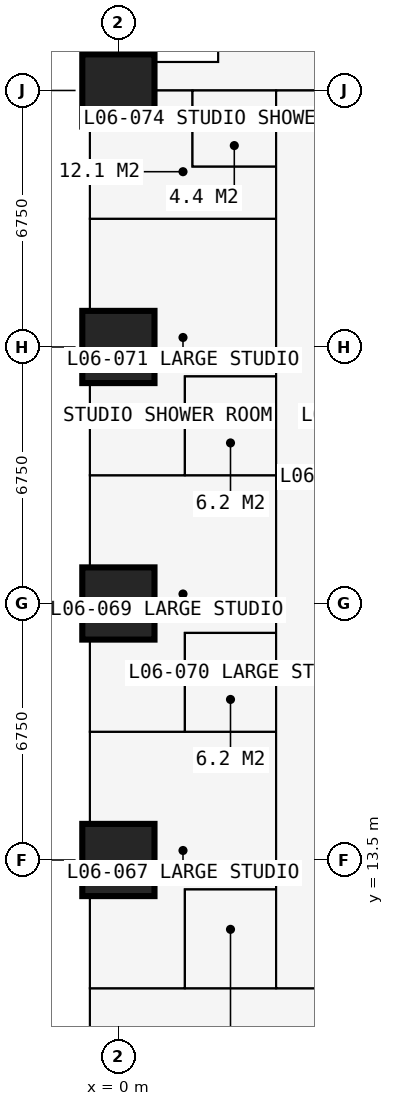
"""IFC4 building model, lengths in metres.
Left out: names, types, materials, properties, quantities, classifications, styles, units other than length and angle.
Written with IfcOpenShell. Run it as: python <this file> out.ifc"""

import sys

from ifc_helpers import new_model, si_unit, direction, frame, frame_2d, origin, origin_2d, place, context, subcontext, project, spatial, rectangle, extrude, element, fill, save


model = new_model("IFC4")
c1 = context("Model", 3, precision=1e-05, world=origin(), true_north=direction((0.0, 1.0)))
c2 = subcontext(c1, "Body", "Model", "MODEL_VIEW")
j1 = project(units=[si_unit("LENGTHUNIT", "METRE"), si_unit("PLANEANGLEUNIT", "RADIAN")], contexts=[c1])
p1 = place(None, origin())
s1 = spatial("IfcSite", under=j1, at=p1, CompositionType="ELEMENT")
p2 = place(p1, origin())
s2 = spatial("IfcBuilding", under=s1, at=p2, CompositionType="ELEMENT")
p3 = place(p2, frame((0.0, 0.0, 25.2)))
s3 = spatial("IfcBuildingStorey", under=s2, at=p3, CompositionType="ELEMENT", Elevation=25.2)
for number, where, z_axis, x_axis in (
    (1, (0.0, 13.5, 0.0), (0.0, 0.0, 1.0), (1.0, 0.0, 0.0)),
    (2, (0.0, 20.25, 0.0), (0.0, 0.0, 1.0), (1.0, 0.0, 0.0)),
    (3, (0.0, 27.0, 0.0), (0.0, 0.0, 1.0), (1.0, 0.0, 0.0)),
    (4, (0.0, 33.75, 0.0), (0.0, 0.0, 1.0), (1.0, 0.0, 0.0)),
):
    element("IfcColumn", number, at=place(p3, frame(where, z_axis=z_axis, x_axis=x_axis)), inside=s3, PredefinedType="COLUMN", context=c2, shape_type="SweptSolid", body=[
        extrude(rectangle(XDim=1.9, YDim=1.9, at=origin_2d()), origin(), (0.0, 0.0, 1.0), 3.6),
    ])
p4 = place(p3, frame((2.625, 37.875, 0.0), z_axis=(0.0, 0.0, 1.0), x_axis=(0.0, -1.0, 0.0)))
e5 = element("IfcWall", 5, at=p4, inside=s3, PredefinedType="SOLIDWALL", context=c2, shape_type="SweptSolid", body=[
    extrude(rectangle(XDim=3.375, YDim=0.3, at=frame_2d((1.688, 0.0))), origin(), (0.0, 0.0, 1.0), 3.375),
])
p5 = place(p4, frame((0.788, 0.0, 0.6)))
e6 = element("IfcOpeningElement", 6, at=p5, cuts=e5, PredefinedType="OPENING", context=c2, shape_type="SweptSolid", body=[
    extrude(rectangle(XDim=1.8, YDim=2.1, at=frame_2d((0.9, 1.05))), frame((0.0, 0.16, 0.0), z_axis=(0.0, -1.0, 0.0), x_axis=(1.0, 0.0, 0.0)), (0.0, 0.0, 1.0), 0.32),
])
p6 = place(p3, frame((2.625, 34.5, 0.0), z_axis=(0.0, 0.0, 1.0), x_axis=(-1.0, 0.0, 0.0)))
e7 = element("IfcWall", 7, at=p6, inside=s3, PredefinedType="SOLIDWALL", context=c2, shape_type="SweptSolid", body=[
    extrude(rectangle(XDim=3.375, YDim=0.3, at=frame_2d((1.688, 0.0))), origin(), (0.0, 0.0, 1.0), 3.375),
])
p7 = place(p6, frame((0.317, 0.0, 0.9)))
e8 = element("IfcOpeningElement", 8, at=p7, cuts=e7, PredefinedType="OPENING", context=c2, shape_type="SweptSolid", body=[
    extrude(rectangle(XDim=1.2, YDim=1.8, at=frame_2d((0.6, 0.9))), frame((0.0, 0.16, 0.0), z_axis=(0.0, -1.0, 0.0), x_axis=(1.0, 0.0, 0.0)), (0.0, 0.0, 1.0), 0.32),
])
p8 = place(p3, frame((-0.75, 13.5, 0.0), z_axis=(0.0, 0.0, 1.0), x_axis=(0.0, 1.0, 0.0)))
e9 = element("IfcWall", 9, at=p8, inside=s3, PredefinedType="SOLIDWALL", context=c2, shape_type="SweptSolid", body=[
    extrude(rectangle(XDim=6.75, YDim=0.15, at=frame_2d((3.375, 0.0))), origin(), (0.0, 0.0, 1.0), 3.375),
])
p9 = place(p8, frame((0.996, 0.0, 0.0)))
e10 = element("IfcOpeningElement", 10, at=p9, cuts=e9, PredefinedType="OPENING", context=c2, shape_type="SweptSolid", body=[
    extrude(rectangle(XDim=1.0, YDim=2.2, at=frame_2d((0.5, 1.1))), frame((0.0, 0.085, 0.0), z_axis=(0.0, -1.0, 0.0), x_axis=(1.0, 0.0, 0.0)), (0.0, 0.0, 1.0), 0.17),
])
p10 = place(p8, frame((2.042, 0.0, 0.9)))
e11 = element("IfcOpeningElement", 11, at=p10, cuts=e9, PredefinedType="OPENING", context=c2, shape_type="SweptSolid", body=[
    extrude(rectangle(XDim=1.2, YDim=1.8, at=frame_2d((0.6, 0.9))), frame((0.0, 0.085, 0.0), z_axis=(0.0, -1.0, 0.0), x_axis=(1.0, 0.0, 0.0)), (0.0, 0.0, 1.0), 0.17),
])
p11 = place(p8, frame((4.754, 0.0, 0.0)))
e12 = element("IfcOpeningElement", 12, at=p11, cuts=e9, PredefinedType="OPENING", context=c2, shape_type="SweptSolid", body=[
    extrude(rectangle(XDim=1.0, YDim=2.2, at=frame_2d((0.5, 1.1))), frame((0.0, 0.085, 0.0), z_axis=(0.0, -1.0, 0.0), x_axis=(1.0, 0.0, 0.0)), (0.0, 0.0, 1.0), 0.17),
])
p12 = place(p8, frame((3.508, 0.0, 0.9)))
e13 = element("IfcOpeningElement", 13, at=p12, cuts=e9, PredefinedType="OPENING", context=c2, shape_type="SweptSolid", body=[
    extrude(rectangle(XDim=1.2, YDim=1.8, at=frame_2d((0.6, 0.9))), frame((0.0, 0.085, 0.0), z_axis=(0.0, -1.0, 0.0), x_axis=(1.0, 0.0, 0.0)), (0.0, 0.0, 1.0), 0.17),
])
p13 = place(p3, frame((-0.85, 16.875, 0.0), z_axis=(0.0, 0.0, 1.0), x_axis=(-1.0, 0.0, 0.0)))
e14 = element("IfcWall", 14, at=p13, inside=s3, PredefinedType="USERDEFINED", context=c2, shape_type="SweptSolid", body=[
    extrude(rectangle(XDim=2.2, YDim=1.0, at=frame_2d((1.1, 0.0))), origin(), (0.0, 0.0, 1.0), 0.9),
])
p14 = place(p3, frame((-0.734, 10.125, 0.0), z_axis=(0.0, 0.0, 1.0), x_axis=(1.0, 0.0, 0.0)))
e15 = element("IfcWall", 15, at=p14, inside=s3, PredefinedType="PARTITIONING", context=c2, shape_type="SweptSolid", body=[
    extrude(rectangle(XDim=10.859, YDim=0.15, at=frame_2d((5.429, 0.0))), origin(), (0.0, 0.0, 1.0), 3.375),
])
p15 = place(p14, frame((5.134, 0.0, 0.0)))
e16 = element("IfcOpeningElement", 16, at=p15, cuts=e15, PredefinedType="OPENING", context=c2, shape_type="SweptSolid", body=[
    extrude(rectangle(XDim=1.0, YDim=2.2, at=frame_2d((0.5, 1.1))), frame((0.0, 0.085, 0.0), z_axis=(0.0, -1.0, 0.0), x_axis=(1.0, 0.0, 0.0)), (0.0, 0.0, 1.0), 0.17),
])
p16 = place(p3, frame((-0.734, 16.875, 0.0), z_axis=(0.0, 0.0, 1.0), x_axis=(1.0, 0.0, 0.0)))
e17 = element("IfcWall", 17, at=p16, inside=s3, PredefinedType="PARTITIONING", context=c2, shape_type="SweptSolid", body=[
    extrude(rectangle(XDim=4.884, YDim=0.175, at=frame_2d((2.442, 0.0))), origin(), (0.0, 0.0, 1.0), 3.375),
])
p17 = place(p16, frame((3.234, 0.0, 0.0)))
e18 = element("IfcOpeningElement", 18, at=p17, cuts=e17, PredefinedType="OPENING", context=c2, shape_type="SweptSolid", body=[
    extrude(rectangle(XDim=0.9, YDim=2.2, at=frame_2d((0.45, 1.1))), frame((0.0, 0.097, 0.0), z_axis=(0.0, -1.0, 0.0), x_axis=(1.0, 0.0, 0.0)), (0.0, 0.0, 1.0), 0.195),
])
p18 = place(p3, frame((-0.734, 23.625, 0.0), z_axis=(0.0, 0.0, 1.0), x_axis=(1.0, 0.0, 0.0)))
e19 = element("IfcWall", 19, at=p18, inside=s3, PredefinedType="PARTITIONING", context=c2, shape_type="SweptSolid", body=[
    extrude(rectangle(XDim=4.884, YDim=0.175, at=frame_2d((2.442, 0.0))), origin(), (0.0, 0.0, 1.0), 3.375),
])
p19 = place(p18, frame((3.234, 0.0, 0.0)))
e20 = element("IfcOpeningElement", 20, at=p19, cuts=e19, PredefinedType="OPENING", context=c2, shape_type="SweptSolid", body=[
    extrude(rectangle(XDim=0.9, YDim=2.2, at=frame_2d((0.45, 1.1))), frame((0.0, 0.097, 0.0), z_axis=(0.0, -1.0, 0.0), x_axis=(1.0, 0.0, 0.0)), (0.0, 0.0, 1.0), 0.195),
])
p20 = place(p3, frame((-0.734, 30.375, 0.0), z_axis=(0.0, 0.0, 1.0), x_axis=(1.0, 0.0, 0.0)))
e21 = element("IfcWall", 21, at=p20, inside=s3, PredefinedType="PARTITIONING", context=c2, shape_type="SweptSolid", body=[
    extrude(rectangle(XDim=4.884, YDim=0.175, at=frame_2d((2.442, 0.0))), origin(), (0.0, 0.0, 1.0), 3.375),
])
p21 = place(p3, frame((-0.734, 33.75, 0.0), z_axis=(0.0, 0.0, 1.0), x_axis=(1.0, 0.0, 0.0)))
e22 = element("IfcWall", 22, at=p21, inside=s3, PredefinedType="PARTITIONING", context=c2, shape_type="SweptSolid", body=[
    extrude(rectangle(XDim=10.859, YDim=0.15, at=frame_2d((5.429, 0.0))), origin(), (0.0, 0.0, 1.0), 2.877),
])
p22 = place(p3, frame((1.75, 10.125, 0.0), z_axis=(0.0, 0.0, 1.0), x_axis=(0.0, 1.0, 0.0)))
e23 = element("IfcWall", 23, at=p22, inside=s3, PredefinedType="PARTITIONING", context=c2, shape_type="SweptSolid", body=[
    extrude(rectangle(XDim=2.6, YDim=0.1, at=frame_2d((1.3, 0.0))), origin(), (0.0, 0.0, 1.0), 3.375),
])
p23 = place(p22, frame((0.85, 0.0, 0.0)))
e24 = element("IfcOpeningElement", 24, at=p23, cuts=e23, PredefinedType="OPENING", context=c2, shape_type="SweptSolid", body=[
    extrude(rectangle(XDim=0.9, YDim=2.2, at=frame_2d((0.45, 1.1))), frame((0.0, 0.06, 0.0), z_axis=(0.0, -1.0, 0.0), x_axis=(1.0, 0.0, 0.0)), (0.0, 0.0, 1.0), 0.12),
])
p24 = place(p3, frame((1.75, 12.725, 0.0), z_axis=(0.0, 0.0, 1.0), x_axis=(1.0, 0.0, 0.0)))
e25 = element("IfcWall", 25, at=p24, inside=s3, PredefinedType="PARTITIONING", context=c2, shape_type="SweptSolid", body=[
    extrude(rectangle(XDim=2.4, YDim=0.1, at=frame_2d((1.2, 0.0))), origin(), (0.0, 0.0, 1.0), 3.375),
])
p25 = place(p3, frame((1.75, 16.875, 0.0), z_axis=(0.0, 0.0, 1.0), x_axis=(0.0, 1.0, 0.0)))
e26 = element("IfcWall", 26, at=p25, inside=s3, PredefinedType="PARTITIONING", context=c2, shape_type="SweptSolid", body=[
    extrude(rectangle(XDim=2.6, YDim=0.1, at=frame_2d((1.3, 0.0))), origin(), (0.0, 0.0, 1.0), 3.375),
])
p26 = place(p3, frame((1.75, 19.475, 0.0), z_axis=(0.0, 0.0, 1.0), x_axis=(1.0, 0.0, 0.0)))
e27 = element("IfcWall", 27, at=p26, inside=s3, PredefinedType="PARTITIONING", context=c2, shape_type="SweptSolid", body=[
    extrude(rectangle(XDim=2.4, YDim=0.1, at=frame_2d((1.2, 0.0))), origin(), (0.0, 0.0, 1.0), 3.375),
])
p27 = place(p3, frame((1.75, 23.625, 0.0), z_axis=(0.0, 0.0, 1.0), x_axis=(0.0, 1.0, 0.0)))
e28 = element("IfcWall", 28, at=p27, inside=s3, PredefinedType="PARTITIONING", context=c2, shape_type="SweptSolid", body=[
    extrude(rectangle(XDim=2.6, YDim=0.1, at=frame_2d((1.3, 0.0))), origin(), (0.0, 0.0, 1.0), 3.375),
])
p28 = place(p3, frame((1.75, 26.225, 0.0), z_axis=(0.0, 0.0, 1.0), x_axis=(1.0, 0.0, 0.0)))
e29 = element("IfcWall", 29, at=p28, inside=s3, PredefinedType="PARTITIONING", context=c2, shape_type="SweptSolid", body=[
    extrude(rectangle(XDim=2.4, YDim=0.1, at=frame_2d((1.2, 0.0))), origin(), (0.0, 0.0, 1.0), 3.375),
])
p29 = place(p3, frame((1.95, 31.75, 0.0), z_axis=(0.0, 0.0, 1.0), x_axis=(0.0, 1.0, 0.0)))
e30 = element("IfcWall", 30, at=p29, inside=s3, PredefinedType="PARTITIONING", context=c2, shape_type="SweptSolid", body=[
    extrude(rectangle(XDim=2.0, YDim=0.1, at=frame_2d((1.0, 0.0))), origin(), (0.0, 0.0, 1.0), 3.375),
])
p30 = place(p3, frame((1.95, 31.75, 0.0), z_axis=(0.0, 0.0, 1.0), x_axis=(1.0, 0.0, 0.0)))
e31 = element("IfcWall", 31, at=p30, inside=s3, PredefinedType="PARTITIONING", context=c2, shape_type="SweptSolid", body=[
    extrude(rectangle(XDim=2.2, YDim=0.1, at=frame_2d((1.1, 0.0))), origin(), (0.0, 0.0, 1.0), 3.375),
])
p31 = place(p30, frame((0.65, 0.0, 0.0)))
e32 = element("IfcOpeningElement", 32, at=p31, cuts=e31, PredefinedType="OPENING", context=c2, shape_type="SweptSolid", body=[
    extrude(rectangle(XDim=0.9, YDim=2.2, at=frame_2d((0.45, 1.1))), frame((0.0, 0.06, 0.0), z_axis=(0.0, -1.0, 0.0), x_axis=(1.0, 0.0, 0.0)), (0.0, 0.0, 1.0), 0.12),
])
p32 = place(p3, frame((4.15, 10.125, 0.0), z_axis=(0.0, 0.0, 1.0), x_axis=(0.0, 1.0, 0.0)))
e33 = element("IfcWall", 33, at=p32, inside=s3, PredefinedType="PARTITIONING", context=c2, shape_type="SweptSolid", body=[
    extrude(rectangle(XDim=23.625, YDim=0.15, at=frame_2d((11.812, 0.0))), origin(), (0.0, 0.0, 1.0), 3.375),
])
p33 = place(p32, frame((4.2, 0.0, 0.0)))
e34 = element("IfcOpeningElement", 34, at=p33, cuts=e33, PredefinedType="OPENING", context=c2, shape_type="SweptSolid", body=[
    extrude(rectangle(XDim=0.95, YDim=2.2, at=frame_2d((0.475, 1.1))), frame((0.0, 0.085, 0.0), z_axis=(0.0, -1.0, 0.0), x_axis=(1.0, 0.0, 0.0)), (0.0, 0.0, 1.0), 0.17),
])
p34 = place(p32, frame((10.95, 0.0, 0.0)))
e35 = element("IfcOpeningElement", 35, at=p34, cuts=e33, PredefinedType="OPENING", context=c2, shape_type="SweptSolid", body=[
    extrude(rectangle(XDim=0.95, YDim=2.2, at=frame_2d((0.475, 1.1))), frame((0.0, 0.085, 0.0), z_axis=(0.0, -1.0, 0.0), x_axis=(1.0, 0.0, 0.0)), (0.0, 0.0, 1.0), 0.17),
])
p35 = place(p32, frame((17.7, 0.0, 0.0)))
e36 = element("IfcOpeningElement", 36, at=p35, cuts=e33, PredefinedType="OPENING", context=c2, shape_type="SweptSolid", body=[
    extrude(rectangle(XDim=0.95, YDim=2.2, at=frame_2d((0.475, 1.1))), frame((0.0, 0.085, 0.0), z_axis=(0.0, -1.0, 0.0), x_axis=(1.0, 0.0, 0.0)), (0.0, 0.0, 1.0), 0.17),
])
p36 = place(p32, frame((20.5, 0.0, 0.0)))
e37 = element("IfcOpeningElement", 37, at=p36, cuts=e33, PredefinedType="OPENING", context=c2, shape_type="SweptSolid", body=[
    extrude(rectangle(XDim=0.95, YDim=2.2, at=frame_2d((0.475, 1.1))), frame((0.0, 0.085, 0.0), z_axis=(0.0, -1.0, 0.0), x_axis=(1.0, 0.0, 0.0)), (0.0, 0.0, 1.0), 0.17),
])
p37 = place(p7, origin())
e38 = element("IfcWindow", 38, at=p37, inside=s3, PartitioningType="SINGLE_PANEL", PredefinedType="WINDOW", context=c2, shape_type="SweptSolid", body=[
    extrude(rectangle(XDim=1.2, YDim=1.8, at=frame_2d((0.6, 0.9))), frame((0.0, 0.03, 0.0), z_axis=(0.0, -1.0, 0.0), x_axis=(1.0, 0.0, 0.0)), (0.0, 0.0, 1.0), 0.06),
])
fill(e8, e38)
p38 = place(p9, origin())
e39 = element("IfcDoor", 39, at=p38, inside=s3, OperationType="SINGLE_SWING_LEFT", PredefinedType="DOOR", context=c2, shape_type="SweptSolid", body=[
    extrude(rectangle(XDim=1.0, YDim=2.2, at=frame_2d((0.5, 1.1))), frame((0.0, 0.025, 0.0), z_axis=(0.0, -1.0, 0.0), x_axis=(1.0, 0.0, 0.0)), (0.0, 0.0, 1.0), 0.05),
])
fill(e10, e39)
p39 = place(p10, origin())
e40 = element("IfcWindow", 40, at=p39, inside=s3, PartitioningType="SINGLE_PANEL", PredefinedType="WINDOW", context=c2, shape_type="SweptSolid", body=[
    extrude(rectangle(XDim=1.2, YDim=1.8, at=frame_2d((0.6, 0.9))), frame((0.0, 0.03, 0.0), z_axis=(0.0, -1.0, 0.0), x_axis=(1.0, 0.0, 0.0)), (0.0, 0.0, 1.0), 0.06),
])
fill(e11, e40)
p40 = place(p11, origin())
e41 = element("IfcDoor", 41, at=p40, inside=s3, OperationType="SINGLE_SWING_RIGHT", PredefinedType="DOOR", context=c2, shape_type="SweptSolid", body=[
    extrude(rectangle(XDim=1.0, YDim=2.2, at=frame_2d((0.5, 1.1))), frame((0.0, 0.025, 0.0), z_axis=(0.0, -1.0, 0.0), x_axis=(1.0, 0.0, 0.0)), (0.0, 0.0, 1.0), 0.05),
])
fill(e12, e41)
p41 = place(p12, origin())
e42 = element("IfcWindow", 42, at=p41, inside=s3, PartitioningType="SINGLE_PANEL", PredefinedType="WINDOW", context=c2, shape_type="SweptSolid", body=[
    extrude(rectangle(XDim=1.2, YDim=1.8, at=frame_2d((0.6, 0.9))), frame((0.0, 0.03, 0.0), z_axis=(0.0, -1.0, 0.0), x_axis=(1.0, 0.0, 0.0)), (0.0, 0.0, 1.0), 0.06),
])
fill(e13, e42)
p42 = place(p15, origin())
e43 = element("IfcDoor", 43, at=p42, inside=s3, OperationType="SINGLE_SWING_LEFT", PredefinedType="DOOR", context=c2, shape_type="SweptSolid", body=[
    extrude(rectangle(XDim=1.0, YDim=2.2, at=frame_2d((0.5, 1.1))), frame((0.0, 0.025, 0.0), z_axis=(0.0, -1.0, 0.0), x_axis=(1.0, 0.0, 0.0)), (0.0, 0.0, 1.0), 0.05),
])
fill(e16, e43)
p43 = place(p33, origin())
e44 = element("IfcDoor", 44, at=p43, inside=s3, OperationType="SINGLE_SWING_LEFT", PredefinedType="DOOR", context=c2, shape_type="SweptSolid", body=[
    extrude(rectangle(XDim=0.95, YDim=2.2, at=frame_2d((0.475, 1.1))), frame((0.0, 0.025, 0.0), z_axis=(0.0, -1.0, 0.0), x_axis=(1.0, 0.0, 0.0)), (0.0, 0.0, 1.0), 0.05),
])
fill(e34, e44)
p44 = place(p23, origin())
e45 = element("IfcDoor", 45, at=p44, inside=s3, OperationType="SINGLE_SWING_RIGHT", PredefinedType="DOOR", context=c2, shape_type="SweptSolid", body=[
    extrude(rectangle(XDim=0.9, YDim=2.2, at=frame_2d((0.45, 1.1))), frame((0.0, 0.025, 0.0), z_axis=(0.0, -1.0, 0.0), x_axis=(1.0, 0.0, 0.0)), (0.0, 0.0, 1.0), 0.05),
])
fill(e24, e45)
p45 = place(p34, origin())
e46 = element("IfcDoor", 46, at=p45, inside=s3, OperationType="SINGLE_SWING_LEFT", PredefinedType="DOOR", context=c2, shape_type="SweptSolid", body=[
    extrude(rectangle(XDim=0.95, YDim=2.2, at=frame_2d((0.475, 1.1))), frame((0.0, 0.025, 0.0), z_axis=(0.0, -1.0, 0.0), x_axis=(1.0, 0.0, 0.0)), (0.0, 0.0, 1.0), 0.05),
])
fill(e35, e46)
p46 = place(p17, origin())
e47 = element("IfcDoor", 47, at=p46, inside=s3, OperationType="SINGLE_SWING_RIGHT", PredefinedType="DOOR", context=c2, shape_type="SweptSolid", body=[
    extrude(rectangle(XDim=0.9, YDim=2.2, at=frame_2d((0.45, 1.1))), frame((0.0, 0.025, 0.0), z_axis=(0.0, -1.0, 0.0), x_axis=(1.0, 0.0, 0.0)), (0.0, 0.0, 1.0), 0.05),
])
fill(e18, e47)
p47 = place(p35, origin())
e48 = element("IfcDoor", 48, at=p47, inside=s3, OperationType="SINGLE_SWING_LEFT", PredefinedType="DOOR", context=c2, shape_type="SweptSolid", body=[
    extrude(rectangle(XDim=0.95, YDim=2.2, at=frame_2d((0.475, 1.1))), frame((0.0, 0.025, 0.0), z_axis=(0.0, -1.0, 0.0), x_axis=(1.0, 0.0, 0.0)), (0.0, 0.0, 1.0), 0.05),
])
fill(e36, e48)
p48 = place(p19, origin())
e49 = element("IfcDoor", 49, at=p48, inside=s3, OperationType="SINGLE_SWING_RIGHT", PredefinedType="DOOR", context=c2, shape_type="SweptSolid", body=[
    extrude(rectangle(XDim=0.9, YDim=2.2, at=frame_2d((0.45, 1.1))), frame((0.0, 0.025, 0.0), z_axis=(0.0, -1.0, 0.0), x_axis=(1.0, 0.0, 0.0)), (0.0, 0.0, 1.0), 0.05),
])
fill(e20, e49)
p49 = place(p36, origin())
e50 = element("IfcDoor", 50, at=p49, inside=s3, OperationType="SINGLE_SWING_LEFT", PredefinedType="DOOR", context=c2, shape_type="SweptSolid", body=[
    extrude(rectangle(XDim=0.95, YDim=2.2, at=frame_2d((0.475, 1.1))), frame((0.0, 0.025, 0.0), z_axis=(0.0, -1.0, 0.0), x_axis=(1.0, 0.0, 0.0)), (0.0, 0.0, 1.0), 0.05),
])
fill(e37, e50)
p50 = place(p31, origin())
e51 = element("IfcDoor", 51, at=p50, inside=s3, OperationType="SINGLE_SWING_RIGHT", PredefinedType="DOOR", context=c2, shape_type="SweptSolid", body=[
    extrude(rectangle(XDim=0.9, YDim=2.2, at=frame_2d((0.45, 1.1))), frame((0.0, 0.025, 0.0), z_axis=(0.0, -1.0, 0.0), x_axis=(1.0, 0.0, 0.0)), (0.0, 0.0, 1.0), 0.05),
])
fill(e32, e51)
save(model, sys.argv[1])
